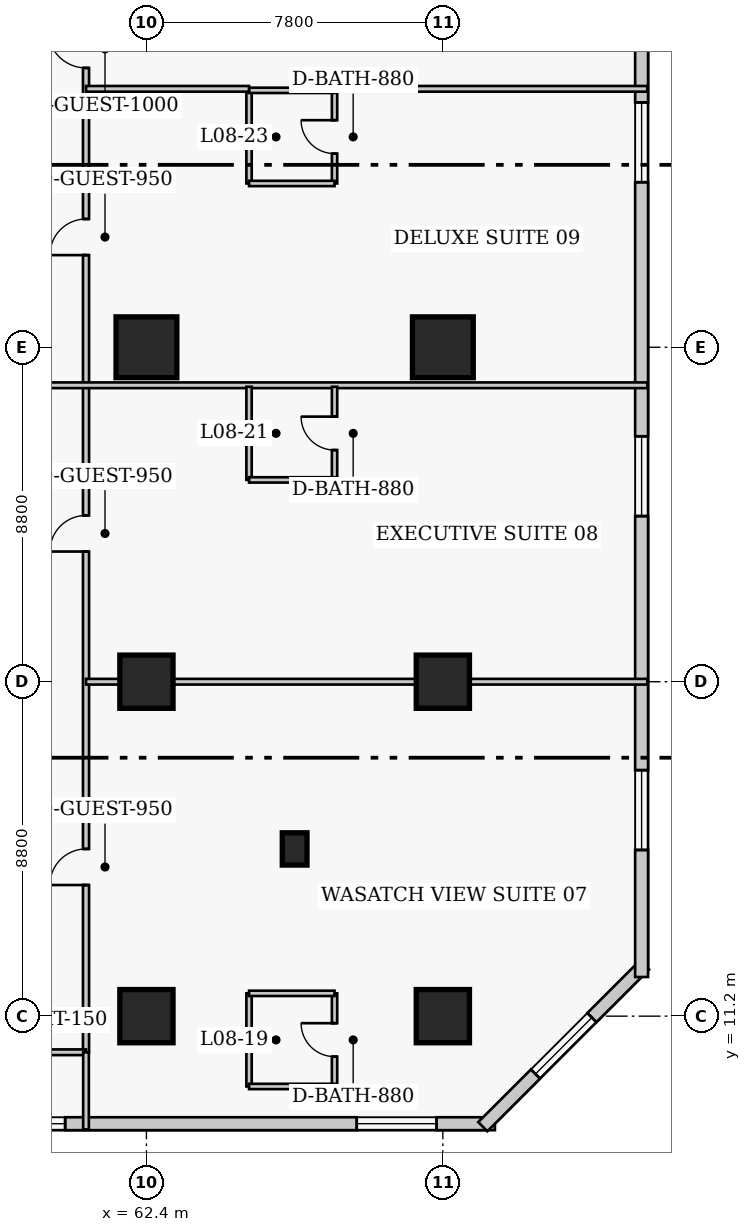
"""IFC4 building model, lengths in metres.
Left out: names, types, materials, properties, quantities, classifications, styles, units other than length and angle.
Written with IfcOpenShell. Run it as: python <this file> out.ifc"""

import sys

from ifc_helpers import new_model, si_unit, direction, frame, frame_2d, origin, origin_2d, place, context, subcontext, project, spatial, rectangle, extrude, element, fill, save


model = new_model("IFC4")
c1 = context("Model", 3, precision=1e-05, world=origin(), true_north=direction((0.0, 1.0)))
c2 = subcontext(c1, "Body", "Model", "MODEL_VIEW")
j1 = project(units=[si_unit("LENGTHUNIT", "METRE"), si_unit("PLANEANGLEUNIT", "RADIAN")], contexts=[c1])
p1 = place(None, origin())
s1 = spatial("IfcSite", under=j1, at=p1, CompositionType="ELEMENT")
p2 = place(p1, origin())
s2 = spatial("IfcBuilding", under=s1, at=p2, CompositionType="ELEMENT")
p3 = place(p2, frame((0.0, 0.0, 37.4)))
s3 = spatial("IfcBuildingStorey", under=s2, at=p3, CompositionType="ELEMENT", Elevation=37.4)
for number, where, z_axis, x_axis in (
    (1, (62.4, 11.2, 0.0), (0.0, 0.0, 1.0), (1.0, 0.0, 0.0)),
    (2, (62.4, 20.0, 0.0), (0.0, 0.0, 1.0), (1.0, 0.0, 0.0)),
):
    element("IfcColumn", number, at=place(p3, frame(where, z_axis=z_axis, x_axis=x_axis)), inside=s3, PredefinedType="COLUMN", context=c2, shape_type="SweptSolid", body=[
        extrude(rectangle(XDim=1.4, YDim=1.4, at=origin_2d()), origin(), (0.0, 0.0, 1.0), 3.8),
    ])
p4 = place(p3, frame((62.4, 28.8, 0.0), z_axis=(0.0, 0.0, 1.0), x_axis=(1.0, 0.0, 0.0)))
e3 = element("IfcColumn", 3, at=p4, inside=s3, PredefinedType="COLUMN", context=c2, shape_type="SweptSolid", body=[
    extrude(rectangle(XDim=1.6, YDim=1.6, at=origin_2d()), origin(), (0.0, 0.0, 1.0), 3.8),
])
for number, where, z_axis, x_axis in (
    (4, (70.2, 11.2, 0.0), (0.0, 0.0, 1.0), (1.0, 0.0, 0.0)),
    (5, (70.2, 20.0, 0.0), (0.0, 0.0, 1.0), (1.0, 0.0, 0.0)),
):
    element("IfcColumn", number, at=place(p3, frame(where, z_axis=z_axis, x_axis=x_axis)), inside=s3, PredefinedType="COLUMN", context=c2, shape_type="SweptSolid", body=[
        extrude(rectangle(XDim=1.4, YDim=1.4, at=origin_2d()), origin(), (0.0, 0.0, 1.0), 3.8),
    ])
p5 = place(p3, frame((70.2, 28.8, 0.0), z_axis=(0.0, 0.0, 1.0), x_axis=(1.0, 0.0, 0.0)))
e6 = element("IfcColumn", 6, at=p5, inside=s3, PredefinedType="COLUMN", context=c2, shape_type="SweptSolid", body=[
    extrude(rectangle(XDim=1.6, YDim=1.6, at=origin_2d()), origin(), (0.0, 0.0, 1.0), 3.8),
])
p6 = place(p3, frame((66.3, 15.6, 0.0), z_axis=(0.0, 0.0, 1.0), x_axis=(1.0, 0.0, 0.0)))
e7 = element("IfcColumn", 7, at=p6, inside=s3, PredefinedType="PILASTER", context=c2, shape_type="SweptSolid", body=[
    extrude(rectangle(XDim=0.65, YDim=0.85, at=origin_2d()), origin(), (0.0, 0.0, 1.0), 3.8),
])
p7 = place(p3, frame((41.68, 8.37, 0.0), z_axis=(0.0, 0.0, 1.0), x_axis=(1.0, 0.0, 0.0)))
e8 = element("IfcWall", 8, at=p7, inside=s3, PredefinedType="SOLIDWALL", context=c2, shape_type="SweptSolid", body=[
    extrude(rectangle(XDim=29.89, YDim=0.34, at=frame_2d((14.945, 0.0))), origin(), (0.0, 0.0, 1.0), 3.54),
])
p8 = place(p7, frame((2.036, 0.0, 0.85)))
e9 = element("IfcOpeningElement", 9, at=p8, cuts=e8, PredefinedType="OPENING", context=c2, shape_type="SweptSolid", body=[
    extrude(rectangle(XDim=2.1, YDim=1.85, at=frame_2d((1.05, 0.925))), frame((0.0, 0.18, 0.0), z_axis=(0.0, -1.0, 0.0), x_axis=(1.0, 0.0, 0.0)), (0.0, 0.0, 1.0), 0.36),
])
p9 = place(p7, frame((9.509, 0.0, 0.85)))
e10 = element("IfcOpeningElement", 10, at=p9, cuts=e8, PredefinedType="OPENING", context=c2, shape_type="SweptSolid", body=[
    extrude(rectangle(XDim=2.1, YDim=1.85, at=frame_2d((1.05, 0.925))), frame((0.0, 0.18, 0.0), z_axis=(0.0, -1.0, 0.0), x_axis=(1.0, 0.0, 0.0)), (0.0, 0.0, 1.0), 0.36),
])
p10 = place(p7, frame((16.481, 0.0, 0.85)))
e11 = element("IfcOpeningElement", 11, at=p10, cuts=e8, PredefinedType="OPENING", context=c2, shape_type="SweptSolid", body=[
    extrude(rectangle(XDim=2.1, YDim=1.85, at=frame_2d((1.05, 0.925))), frame((0.0, 0.18, 0.0), z_axis=(0.0, -1.0, 0.0), x_axis=(1.0, 0.0, 0.0)), (0.0, 0.0, 1.0), 0.36),
])
p11 = place(p7, frame((26.254, 0.0, 0.85)))
e12 = element("IfcOpeningElement", 12, at=p11, cuts=e8, PredefinedType="OPENING", context=c2, shape_type="SweptSolid", body=[
    extrude(rectangle(XDim=2.1, YDim=1.85, at=frame_2d((1.05, 0.925))), frame((0.0, 0.18, 0.0), z_axis=(0.0, -1.0, 0.0), x_axis=(1.0, 0.0, 0.0)), (0.0, 0.0, 1.0), 0.36),
])
p12 = place(p3, frame((71.251, 8.292, 0.0), z_axis=(0.0, 0.0, 1.0), x_axis=(0.707106781187, 0.707106781187, 0.0)))
e13 = element("IfcWall", 13, at=p12, inside=s3, PredefinedType="SOLIDWALL", context=c2, shape_type="SweptSolid", body=[
    extrude(rectangle(XDim=6.02, YDim=0.34, at=frame_2d((3.01, 0.0))), origin(), (0.0, 0.0, 1.0), 3.54),
])
p13 = place(p12, frame((1.96, 0.0, 0.85)))
e14 = element("IfcOpeningElement", 14, at=p13, cuts=e13, PredefinedType="OPENING", context=c2, shape_type="SweptSolid", body=[
    extrude(rectangle(XDim=2.1, YDim=1.85, at=frame_2d((1.05, 0.925))), frame((0.0, 0.18, 0.0), z_axis=(0.0, -1.0, 0.0), x_axis=(1.0, 0.0, 0.0)), (0.0, 0.0, 1.0), 0.36),
])
p14 = place(p3, frame((75.43, 12.23, 0.0), z_axis=(0.0, 0.0, 1.0), x_axis=(0.0, 1.0, 0.0)))
e15 = element("IfcWall", 15, at=p14, inside=s3, PredefinedType="SOLIDWALL", context=c2, shape_type="SweptSolid", body=[
    extrude(rectangle(XDim=35.14, YDim=0.34, at=frame_2d((17.57, 0.0))), origin(), (0.0, 0.0, 1.0), 3.54),
])
p15 = place(p14, frame((3.343, 0.0, 0.85)))
e16 = element("IfcOpeningElement", 16, at=p15, cuts=e15, PredefinedType="OPENING", context=c2, shape_type="SweptSolid", body=[
    extrude(rectangle(XDim=2.1, YDim=1.85, at=frame_2d((1.05, 0.925))), frame((0.0, 0.18, 0.0), z_axis=(0.0, -1.0, 0.0), x_axis=(1.0, 0.0, 0.0)), (0.0, 0.0, 1.0), 0.36),
])
p16 = place(p14, frame((12.127, 0.0, 0.85)))
e17 = element("IfcOpeningElement", 17, at=p16, cuts=e15, PredefinedType="OPENING", context=c2, shape_type="SweptSolid", body=[
    extrude(rectangle(XDim=2.1, YDim=1.85, at=frame_2d((1.05, 0.925))), frame((0.0, 0.18, 0.0), z_axis=(0.0, -1.0, 0.0), x_axis=(1.0, 0.0, 0.0)), (0.0, 0.0, 1.0), 0.36),
])
p17 = place(p14, frame((20.913, 0.0, 0.85)))
e18 = element("IfcOpeningElement", 18, at=p17, cuts=e15, PredefinedType="OPENING", context=c2, shape_type="SweptSolid", body=[
    extrude(rectangle(XDim=2.1, YDim=1.85, at=frame_2d((1.05, 0.925))), frame((0.0, 0.18, 0.0), z_axis=(0.0, -1.0, 0.0), x_axis=(1.0, 0.0, 0.0)), (0.0, 0.0, 1.0), 0.36),
])
p18 = place(p14, frame((29.698, 0.0, 0.85)))
e19 = element("IfcOpeningElement", 19, at=p18, cuts=e15, PredefinedType="OPENING", context=c2, shape_type="SweptSolid", body=[
    extrude(rectangle(XDim=2.1, YDim=1.85, at=frame_2d((1.05, 0.925))), frame((0.0, 0.18, 0.0), z_axis=(0.0, -1.0, 0.0), x_axis=(1.0, 0.0, 0.0)), (0.0, 0.0, 1.0), 0.36),
])
p19 = place(p3, frame((60.81, 10.25, 0.0), z_axis=(0.0, 0.0, 1.0), x_axis=(0.0, 1.0, 0.0)))
e20 = element("IfcWall", 20, at=p19, inside=s3, PredefinedType="PARTITIONING", context=c2, shape_type="SweptSolid", body=[
    extrude(rectangle(XDim=30.4, YDim=0.16, at=frame_2d((15.2, 0.0))), origin(), (0.0, 0.0, 1.0), 3.54),
])
p20 = place(p19, frame((4.4, 0.0, 0.0)))
e21 = element("IfcOpeningElement", 21, at=p20, cuts=e20, PredefinedType="OPENING", context=c2, shape_type="SweptSolid", body=[
    extrude(rectangle(XDim=0.95, YDim=2.1, at=frame_2d((0.475, 1.05))), frame((0.0, 0.09, 0.0), z_axis=(0.0, -1.0, 0.0), x_axis=(1.0, 0.0, 0.0)), (0.0, 0.0, 1.0), 0.18),
])
p21 = place(p19, frame((13.175, 0.0, 0.0)))
e22 = element("IfcOpeningElement", 22, at=p21, cuts=e20, PredefinedType="OPENING", context=c2, shape_type="SweptSolid", body=[
    extrude(rectangle(XDim=0.95, YDim=2.1, at=frame_2d((0.475, 1.05))), frame((0.0, 0.09, 0.0), z_axis=(0.0, -1.0, 0.0), x_axis=(1.0, 0.0, 0.0)), (0.0, 0.0, 1.0), 0.18),
])
p22 = place(p19, frame((20.975, 0.0, 0.0)))
e23 = element("IfcOpeningElement", 23, at=p22, cuts=e20, PredefinedType="OPENING", context=c2, shape_type="SweptSolid", body=[
    extrude(rectangle(XDim=0.95, YDim=2.1, at=frame_2d((0.475, 1.05))), frame((0.0, 0.09, 0.0), z_axis=(0.0, -1.0, 0.0), x_axis=(1.0, 0.0, 0.0)), (0.0, 0.0, 1.0), 0.18),
])
p23 = place(p19, frame((25.9, 0.0, 0.0)))
e24 = element("IfcOpeningElement", 24, at=p23, cuts=e20, PredefinedType="OPENING", context=c2, shape_type="SweptSolid", body=[
    extrude(rectangle(XDim=1.0, YDim=2.15, at=frame_2d((0.5, 1.075))), frame((0.0, 0.09, 0.0), z_axis=(0.0, -1.0, 0.0), x_axis=(1.0, 0.0, 0.0)), (0.0, 0.0, 1.0), 0.18),
])
p24 = place(p3, frame((58.59, 10.25, 0.0), z_axis=(0.0, 0.0, 1.0), x_axis=(1.0, 0.0, 0.0)))
e25 = element("IfcWall", 25, at=p24, inside=s3, PredefinedType="PARTITIONING", context=c2, shape_type="SweptSolid", body=[
    extrude(rectangle(XDim=2.22, YDim=0.15, at=frame_2d((1.11, 0.0))), origin(), (0.0, 0.0, 1.0), 3.54),
])
p25 = place(p3, frame((60.81, 8.22, 0.0), z_axis=(0.0, 0.0, 1.0), x_axis=(0.0, 1.0, 0.0)))
e26 = element("IfcWall", 26, at=p25, inside=s3, PredefinedType="PARTITIONING", context=c2, shape_type="SweptSolid", body=[
    extrude(rectangle(XDim=2.03, YDim=0.15, at=frame_2d((1.015, 0.0))), origin(), (0.0, 0.0, 1.0), 3.54),
])
p26 = place(p3, frame((65.1, 9.35, 0.0), z_axis=(0.0, 0.0, 1.0), x_axis=(0.0, 1.0, 0.0)))
e27 = element("IfcWall", 27, at=p26, inside=s3, PredefinedType="PLUMBINGWALL", context=c2, shape_type="SweptSolid", body=[
    extrude(rectangle(XDim=2.45, YDim=0.14, at=frame_2d((1.225, 0.0))), origin(), (0.0, 0.0, 1.0), 3.54),
])
p27 = place(p3, frame((67.35, 9.35, 0.0), z_axis=(0.0, 0.0, 1.0), x_axis=(0.0, 1.0, 0.0)))
e28 = element("IfcWall", 28, at=p27, inside=s3, PredefinedType="PLUMBINGWALL", context=c2, shape_type="SweptSolid", body=[
    extrude(rectangle(XDim=2.45, YDim=0.14, at=frame_2d((1.225, 0.0))), origin(), (0.0, 0.0, 1.0), 3.54),
])
p28 = place(p27, frame((0.785, 0.0, 0.0)))
e29 = element("IfcOpeningElement", 29, at=p28, cuts=e28, PredefinedType="OPENING", context=c2, shape_type="SweptSolid", body=[
    extrude(rectangle(XDim=0.88, YDim=2.05, at=frame_2d((0.44, 1.025))), frame((0.0, 0.08, 0.0), z_axis=(0.0, -1.0, 0.0), x_axis=(1.0, 0.0, 0.0)), (0.0, 0.0, 1.0), 0.16),
])
for number, where, z_axis, x_axis in (
    (30, (65.1, 9.35, 0.0), (0.0, 0.0, 1.0), (1.0, 0.0, 0.0)),
    (31, (65.1, 11.8, 0.0), (0.0, 0.0, 1.0), (1.0, 0.0, 0.0)),
):
    element("IfcWall", number, at=place(p3, frame(where, z_axis=z_axis, x_axis=x_axis)), inside=s3, PredefinedType="PLUMBINGWALL", context=c2, shape_type="SweptSolid", body=[
        extrude(rectangle(XDim=2.25, YDim=0.14, at=frame_2d((1.125, 0.0))), origin(), (0.0, 0.0, 1.0), 3.54),
    ])
p29 = place(p3, frame((60.81, 20.0, 0.0), z_axis=(0.0, 0.0, 1.0), x_axis=(1.0, 0.0, 0.0)))
e32 = element("IfcWall", 32, at=p29, inside=s3, PredefinedType="PARTITIONING", context=c2, shape_type="SweptSolid", body=[
    extrude(rectangle(XDim=14.77, YDim=0.15, at=frame_2d((7.385, 0.0))), origin(), (0.0, 0.0, 1.0), 2.593),
])
p30 = place(p3, frame((58.86, 27.8, 0.0), z_axis=(0.0, 0.0, 1.0), x_axis=(1.0, 0.0, 0.0)))
e33 = element("IfcWall", 33, at=p30, inside=s3, PredefinedType="PARTITIONING", context=c2, shape_type="SweptSolid", body=[
    extrude(rectangle(XDim=16.72, YDim=0.15, at=frame_2d((8.36, 0.0))), origin(), (0.0, 0.0, 1.0), 3.54),
])
p31 = place(p3, frame((65.1, 25.31, 0.0), z_axis=(0.0, 0.0, 1.0), x_axis=(0.0, 1.0, 0.0)))
e34 = element("IfcWall", 34, at=p31, inside=s3, PredefinedType="PLUMBINGWALL", context=c2, shape_type="SweptSolid", body=[
    extrude(rectangle(XDim=2.45, YDim=0.14, at=frame_2d((1.225, 0.0))), origin(), (0.0, 0.0, 1.0), 3.54),
])
p32 = place(p3, frame((67.35, 25.31, 0.0), z_axis=(0.0, 0.0, 1.0), x_axis=(0.0, 1.0, 0.0)))
e35 = element("IfcWall", 35, at=p32, inside=s3, PredefinedType="PLUMBINGWALL", context=c2, shape_type="SweptSolid", body=[
    extrude(rectangle(XDim=2.45, YDim=0.14, at=frame_2d((1.225, 0.0))), origin(), (0.0, 0.0, 1.0), 3.54),
])
p33 = place(p32, frame((0.785, 0.0, 0.0)))
e36 = element("IfcOpeningElement", 36, at=p33, cuts=e35, PredefinedType="OPENING", context=c2, shape_type="SweptSolid", body=[
    extrude(rectangle(XDim=0.88, YDim=2.05, at=frame_2d((0.44, 1.025))), frame((0.0, 0.08, 0.0), z_axis=(0.0, -1.0, 0.0), x_axis=(1.0, 0.0, 0.0)), (0.0, 0.0, 1.0), 0.16),
])
p34 = place(p3, frame((65.1, 25.31, 0.0), z_axis=(0.0, 0.0, 1.0), x_axis=(1.0, 0.0, 0.0)))
e37 = element("IfcWall", 37, at=p34, inside=s3, PredefinedType="PLUMBINGWALL", context=c2, shape_type="SweptSolid", body=[
    extrude(rectangle(XDim=2.25, YDim=0.14, at=frame_2d((1.125, 0.0))), origin(), (0.0, 0.0, 1.0), 3.54),
])
p35 = place(p3, frame((65.1, 33.11, 0.0), z_axis=(0.0, 0.0, 1.0), x_axis=(0.0, 1.0, 0.0)))
e38 = element("IfcWall", 38, at=p35, inside=s3, PredefinedType="PLUMBINGWALL", context=c2, shape_type="SweptSolid", body=[
    extrude(rectangle(XDim=2.45, YDim=0.14, at=frame_2d((1.225, 0.0))), origin(), (0.0, 0.0, 1.0), 3.54),
])
p36 = place(p3, frame((67.35, 33.11, 0.0), z_axis=(0.0, 0.0, 1.0), x_axis=(0.0, 1.0, 0.0)))
e39 = element("IfcWall", 39, at=p36, inside=s3, PredefinedType="PLUMBINGWALL", context=c2, shape_type="SweptSolid", body=[
    extrude(rectangle(XDim=2.45, YDim=0.14, at=frame_2d((1.225, 0.0))), origin(), (0.0, 0.0, 1.0), 3.54),
])
p37 = place(p36, frame((0.785, 0.0, 0.0)))
e40 = element("IfcOpeningElement", 40, at=p37, cuts=e39, PredefinedType="OPENING", context=c2, shape_type="SweptSolid", body=[
    extrude(rectangle(XDim=0.88, YDim=2.05, at=frame_2d((0.44, 1.025))), frame((0.0, 0.08, 0.0), z_axis=(0.0, -1.0, 0.0), x_axis=(1.0, 0.0, 0.0)), (0.0, 0.0, 1.0), 0.16),
])
for number, where, z_axis, x_axis in (
    (41, (65.1, 33.11, 0.0), (0.0, 0.0, 1.0), (1.0, 0.0, 0.0)),
    (42, (65.1, 35.56, 0.0), (0.0, 0.0, 1.0), (1.0, 0.0, 0.0)),
):
    element("IfcWall", number, at=place(p3, frame(where, z_axis=z_axis, x_axis=x_axis)), inside=s3, PredefinedType="PLUMBINGWALL", context=c2, shape_type="SweptSolid", body=[
        extrude(rectangle(XDim=2.25, YDim=0.14, at=frame_2d((1.125, 0.0))), origin(), (0.0, 0.0, 1.0), 3.54),
    ])
p38 = place(p3, frame((60.81, 35.6, 0.0), z_axis=(0.0, 0.0, 1.0), x_axis=(1.0, 0.0, 0.0)))
e43 = element("IfcWall", 43, at=p38, inside=s3, PredefinedType="PARTITIONING", context=c2, shape_type="SweptSolid", body=[
    extrude(rectangle(XDim=4.29, YDim=0.15, at=frame_2d((2.145, 0.0))), origin(), (0.0, 0.0, 1.0), 3.54),
])
p39 = place(p3, frame((67.35, 35.6, 0.0), z_axis=(0.0, 0.0, 1.0), x_axis=(1.0, 0.0, 0.0)))
e44 = element("IfcWall", 44, at=p39, inside=s3, PredefinedType="PARTITIONING", context=c2, shape_type="SweptSolid", body=[
    extrude(rectangle(XDim=8.23, YDim=0.15, at=frame_2d((4.115, 0.0))), origin(), (0.0, 0.0, 1.0), 3.54),
])
p40 = place(p10, origin())
e45 = element("IfcWindow", 45, at=p40, inside=s3, PartitioningType="SINGLE_PANEL", PredefinedType="WINDOW", context=c2, shape_type="SweptSolid", body=[
    extrude(rectangle(XDim=2.1, YDim=1.85, at=frame_2d((1.05, 0.925))), frame((0.0, 0.03, 0.0), z_axis=(0.0, -1.0, 0.0), x_axis=(1.0, 0.0, 0.0)), (0.0, 0.0, 1.0), 0.06),
])
fill(e11, e45)
p41 = place(p11, origin())
e46 = element("IfcWindow", 46, at=p41, inside=s3, PartitioningType="SINGLE_PANEL", PredefinedType="WINDOW", context=c2, shape_type="SweptSolid", body=[
    extrude(rectangle(XDim=2.1, YDim=1.85, at=frame_2d((1.05, 0.925))), frame((0.0, 0.03, 0.0), z_axis=(0.0, -1.0, 0.0), x_axis=(1.0, 0.0, 0.0)), (0.0, 0.0, 1.0), 0.06),
])
fill(e12, e46)
p42 = place(p13, origin())
e47 = element("IfcWindow", 47, at=p42, inside=s3, PartitioningType="SINGLE_PANEL", PredefinedType="WINDOW", context=c2, shape_type="SweptSolid", body=[
    extrude(rectangle(XDim=2.1, YDim=1.85, at=frame_2d((1.05, 0.925))), frame((0.0, 0.03, 0.0), z_axis=(0.0, -1.0, 0.0), x_axis=(1.0, 0.0, 0.0)), (0.0, 0.0, 1.0), 0.06),
])
fill(e14, e47)
p43 = place(p15, origin())
e48 = element("IfcWindow", 48, at=p43, inside=s3, PartitioningType="SINGLE_PANEL", PredefinedType="WINDOW", context=c2, shape_type="SweptSolid", body=[
    extrude(rectangle(XDim=2.1, YDim=1.85, at=frame_2d((1.05, 0.925))), frame((0.0, 0.03, 0.0), z_axis=(0.0, -1.0, 0.0), x_axis=(1.0, 0.0, 0.0)), (0.0, 0.0, 1.0), 0.06),
])
fill(e16, e48)
p44 = place(p16, origin())
e49 = element("IfcWindow", 49, at=p44, inside=s3, PartitioningType="SINGLE_PANEL", PredefinedType="WINDOW", context=c2, shape_type="SweptSolid", body=[
    extrude(rectangle(XDim=2.1, YDim=1.85, at=frame_2d((1.05, 0.925))), frame((0.0, 0.03, 0.0), z_axis=(0.0, -1.0, 0.0), x_axis=(1.0, 0.0, 0.0)), (0.0, 0.0, 1.0), 0.06),
])
fill(e17, e49)
p45 = place(p17, origin())
e50 = element("IfcWindow", 50, at=p45, inside=s3, PartitioningType="SINGLE_PANEL", PredefinedType="WINDOW", context=c2, shape_type="SweptSolid", body=[
    extrude(rectangle(XDim=2.1, YDim=1.85, at=frame_2d((1.05, 0.925))), frame((0.0, 0.03, 0.0), z_axis=(0.0, -1.0, 0.0), x_axis=(1.0, 0.0, 0.0)), (0.0, 0.0, 1.0), 0.06),
])
fill(e18, e50)
p46 = place(p28, origin())
e51 = element("IfcDoor", 51, at=p46, inside=s3, OperationType="SINGLE_SWING_RIGHT", PredefinedType="DOOR", context=c2, shape_type="SweptSolid", body=[
    extrude(rectangle(XDim=0.88, YDim=2.05, at=frame_2d((0.44, 1.025))), frame((0.0, 0.025, 0.0), z_axis=(0.0, -1.0, 0.0), x_axis=(1.0, 0.0, 0.0)), (0.0, 0.0, 1.0), 0.05),
])
fill(e29, e51)
p47 = place(p20, origin())
e52 = element("IfcDoor", 52, at=p47, inside=s3, OperationType="SINGLE_SWING_LEFT", PredefinedType="DOOR", context=c2, shape_type="SweptSolid", body=[
    extrude(rectangle(XDim=0.95, YDim=2.1, at=frame_2d((0.475, 1.05))), frame((0.0, 0.025, 0.0), z_axis=(0.0, -1.0, 0.0), x_axis=(1.0, 0.0, 0.0)), (0.0, 0.0, 1.0), 0.05),
])
fill(e21, e52)
p48 = place(p33, origin())
e53 = element("IfcDoor", 53, at=p48, inside=s3, OperationType="SINGLE_SWING_RIGHT", PredefinedType="DOOR", context=c2, shape_type="SweptSolid", body=[
    extrude(rectangle(XDim=0.88, YDim=2.05, at=frame_2d((0.44, 1.025))), frame((0.0, 0.025, 0.0), z_axis=(0.0, -1.0, 0.0), x_axis=(1.0, 0.0, 0.0)), (0.0, 0.0, 1.0), 0.05),
])
fill(e36, e53)
p49 = place(p21, origin())
e54 = element("IfcDoor", 54, at=p49, inside=s3, OperationType="SINGLE_SWING_LEFT", PredefinedType="DOOR", context=c2, shape_type="SweptSolid", body=[
    extrude(rectangle(XDim=0.95, YDim=2.1, at=frame_2d((0.475, 1.05))), frame((0.0, 0.025, 0.0), z_axis=(0.0, -1.0, 0.0), x_axis=(1.0, 0.0, 0.0)), (0.0, 0.0, 1.0), 0.05),
])
fill(e22, e54)
p50 = place(p37, origin())
e55 = element("IfcDoor", 55, at=p50, inside=s3, OperationType="SINGLE_SWING_RIGHT", PredefinedType="DOOR", context=c2, shape_type="SweptSolid", body=[
    extrude(rectangle(XDim=0.88, YDim=2.05, at=frame_2d((0.44, 1.025))), frame((0.0, 0.025, 0.0), z_axis=(0.0, -1.0, 0.0), x_axis=(1.0, 0.0, 0.0)), (0.0, 0.0, 1.0), 0.05),
])
fill(e40, e55)
p51 = place(p22, origin())
e56 = element("IfcDoor", 56, at=p51, inside=s3, OperationType="SINGLE_SWING_LEFT", PredefinedType="DOOR", context=c2, shape_type="SweptSolid", body=[
    extrude(rectangle(XDim=0.95, YDim=2.1, at=frame_2d((0.475, 1.05))), frame((0.0, 0.025, 0.0), z_axis=(0.0, -1.0, 0.0), x_axis=(1.0, 0.0, 0.0)), (0.0, 0.0, 1.0), 0.05),
])
fill(e23, e56)
p52 = place(p23, origin())
e57 = element("IfcDoor", 57, at=p52, inside=s3, OperationType="SINGLE_SWING_RIGHT", PredefinedType="DOOR", context=c2, shape_type="SweptSolid", body=[
    extrude(rectangle(XDim=1.0, YDim=2.15, at=frame_2d((0.5, 1.075))), frame((0.0, 0.025, 0.0), z_axis=(0.0, -1.0, 0.0), x_axis=(1.0, 0.0, 0.0)), (0.0, 0.0, 1.0), 0.05),
])
fill(e24, e57)
save(model, sys.argv[1])
